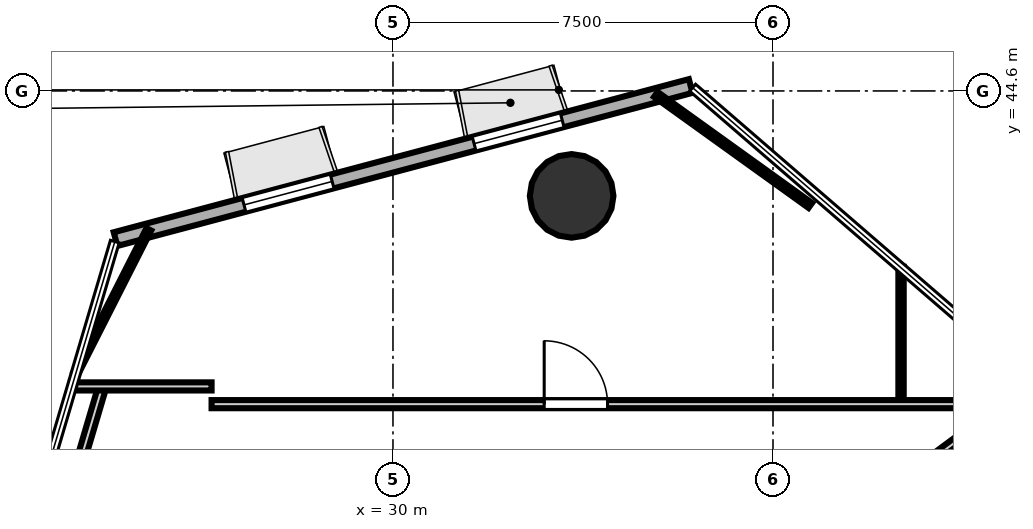
"""IFC4 building model, lengths in metres.
Left out: names, types, materials, properties, quantities, classifications, styles, units other than length and angle.
Written with IfcOpenShell. Run it as: python <this file> out.ifc"""

import sys

from ifc_helpers import new_model, si_unit, direction, frame, frame_2d, origin, origin_2d, place, context, subcontext, project, spatial, rectangle, hollow_circle, extrude, element, fill, save


model = new_model("IFC4")
c1 = context("Model", 3, precision=1e-05, world=origin(), true_north=direction((0.0, 1.0)))
c2 = subcontext(c1, "Body", "Model", "MODEL_VIEW")
j1 = project(units=[si_unit("LENGTHUNIT", "METRE"), si_unit("PLANEANGLEUNIT", "RADIAN")], contexts=[c1])
p1 = place(None, origin())
s1 = spatial("IfcSite", under=j1, at=p1, CompositionType="ELEMENT")
p2 = place(p1, origin())
s2 = spatial("IfcBuilding", under=s1, at=p2, CompositionType="ELEMENT")
p3 = place(p2, frame((0.0, 0.0, 74.7)))
s3 = spatial("IfcBuildingStorey", under=s2, at=p3, CompositionType="ELEMENT", Elevation=74.7)
p4 = place(p3, frame((33.526, 42.529, 0.0), z_axis=(0.0, 0.0, 1.0), x_axis=(1.0, 0.0, 0.0)))
e1 = element("IfcColumn", 1, at=p4, inside=s3, PredefinedType="COLUMN", context=c2, shape_type="SweptSolid", body=[
    extrude(hollow_circle(Radius=0.825, WallThickness=0.04, at=origin_2d()), origin(), (0.0, 0.0, 1.0), 3.7),
])
p5 = place(p3, frame((35.876, 44.697, 0.0), z_axis=(0.0, 0.0, 1.0), x_axis=(-0.966352126806, -0.257222796459, 0.0)))
e2 = element("IfcWall", 2, at=p5, inside=s3, PredefinedType="SOLIDWALL", context=c2, shape_type="SweptSolid", body=[
    extrude(rectangle(XDim=11.747, YDim=0.28, at=frame_2d((5.873, 0.0))), origin(), (0.0, 0.0, 1.0), 3.52),
])
p6 = place(p5, frame((2.624, 0.0, 0.85)))
e3 = element("IfcOpeningElement", 3, at=p6, cuts=e2, PredefinedType="OPENING", context=c2, shape_type="SweptSolid", body=[
    extrude(rectangle(XDim=1.8, YDim=2.1, at=frame_2d((0.9, 1.05))), frame((0.0, 0.15, 0.0), z_axis=(0.0, -1.0, 0.0), x_axis=(1.0, 0.0, 0.0)), (0.0, 0.0, 1.0), 0.3),
])
p7 = place(p5, frame((7.323, 0.0, 0.85)))
e4 = element("IfcOpeningElement", 4, at=p7, cuts=e2, PredefinedType="OPENING", context=c2, shape_type="SweptSolid", body=[
    extrude(rectangle(XDim=1.8, YDim=2.1, at=frame_2d((0.9, 1.05))), frame((0.0, 0.15, 0.0), z_axis=(0.0, -1.0, 0.0), x_axis=(1.0, 0.0, 0.0)), (0.0, 0.0, 1.0), 0.3),
])
p8 = place(p3, frame((23.58, 36.452, 0.0), z_axis=(0.0, 0.0, 1.0), x_axis=(0.283774880496, 0.958890930815, 0.0)))
e5 = element("IfcWall", 5, at=p8, inside=s3, PredefinedType="PARTITIONING", context=c2, shape_type="SweptSolid", body=[
    extrude(rectangle(XDim=2.44, YDim=0.16, at=frame_2d((1.22, 0.0))), origin(), (0.0, 0.0, 1.0), 2.84),
])
p9 = place(p3, frame((23.645, 38.769, 0.0), z_axis=(0.0, 0.0, 1.0), x_axis=(1.0, 0.0, 0.0)))
e6 = element("IfcWall", 6, at=p9, inside=s3, PredefinedType="PARTITIONING", context=c2, shape_type="SweptSolid", body=[
    extrude(rectangle(XDim=2.775, YDim=0.16, at=frame_2d((1.388, 0.0))), origin(), (0.0, 0.0, 1.0), 2.84),
])
p10 = place(p3, frame((26.42, 38.419, 0.0), z_axis=(0.0, 0.0, 1.0), x_axis=(1.0, 0.0, 0.0)))
e7 = element("IfcWall", 7, at=p10, inside=s3, PredefinedType="PARTITIONING", context=c2, shape_type="SweptSolid", body=[
    extrude(rectangle(XDim=16.741, YDim=0.16, at=frame_2d((8.37, 0.0))), origin(), (0.0, 0.0, 1.0), 2.798),
])
p11 = place(p10, frame((6.564, 0.0, 0.0)))
e8 = element("IfcOpeningElement", 8, at=p11, cuts=e7, PredefinedType="OPENING", context=c2, shape_type="SweptSolid", body=[
    extrude(rectangle(XDim=1.25, YDim=2.2, at=frame_2d((0.625, 1.1))), frame((0.0, 0.09, 0.0), z_axis=(0.0, -1.0, 0.0), x_axis=(1.0, 0.0, 0.0)), (0.0, 0.0, 1.0), 0.18),
])
p12 = place(p3, frame((42.68, 38.843, 0.0), z_axis=(0.0, 0.0, 1.0), x_axis=(-0.80280556572, -0.596240910747, 0.0)))
e9 = element("IfcWall", 9, at=p12, inside=s3, PredefinedType="PARTITIONING", context=c2, shape_type="SweptSolid", body=[
    extrude(rectangle(XDim=3.571, YDim=0.16, at=frame_2d((1.785, 0.0))), origin(), (0.0, 0.0, 1.0), 2.798),
])
p13 = place(p3, frame((40.027, 41.13, 0.0), z_axis=(0.0, 0.0, 1.0), x_axis=(0.0, -1.0, 0.0)))
e10 = element("IfcWall", 10, at=p13, inside=s3, PredefinedType="PARTITIONING", context=c2, shape_type="SweptSolid", body=[
    extrude(rectangle(XDim=2.6, YDim=0.105, at=frame_2d((1.3, 0.0))), origin(), (0.0, 0.0, 1.0), 2.84),
])
p14 = place(p3, frame((23.743, 39.035, 0.0), z_axis=(0.0, 0.0, 1.0), x_axis=(0.452766588837, 0.891629079849, 0.0)))
e11 = element("IfcWall", 11, at=p14, inside=s3, PredefinedType="PARTITIONING", context=c2, shape_type="SweptSolid", body=[
    extrude(rectangle(XDim=3.178, YDim=0.105, at=frame_2d((1.589, 0.0))), origin(), (0.0, 0.0, 1.0), 2.84),
])
p15 = place(p3, frame((35.187, 44.531, 0.0), z_axis=(0.0, 0.0, 1.0), x_axis=(0.812091442734, -0.583530195139, 0.0)))
e12 = element("IfcWall", 12, at=p15, inside=s3, PredefinedType="PARTITIONING", context=c2, shape_type="SweptSolid", body=[
    extrude(rectangle(XDim=3.755, YDim=0.12, at=frame_2d((1.877, 0.0))), origin(), (0.0, 0.0, 1.0), 2.84),
])
p16 = place(p11, origin())
e13 = element("IfcDoor", 13, at=p16, inside=s3, OperationType="SINGLE_SWING_LEFT", PredefinedType="DOOR", context=c2, shape_type="SweptSolid", body=[
    extrude(rectangle(XDim=1.25, YDim=2.2, at=frame_2d((0.625, 1.1))), frame((0.0, 0.025, 0.0), z_axis=(0.0, -1.0, 0.0), x_axis=(1.0, 0.0, 0.0)), (0.0, 0.0, 1.0), 0.05),
])
fill(e8, e13)
p17 = place(p6, origin())
e14 = element("IfcWindow", 14, at=p17, inside=s3, PartitioningType="SINGLE_PANEL", PredefinedType="WINDOW", context=c2, shape_type="SweptSolid", body=[
    extrude(rectangle(XDim=1.8, YDim=2.1, at=frame_2d((0.9, 1.05))), frame((0.0, 0.03, 0.0), z_axis=(0.0, -1.0, 0.0), x_axis=(1.0, 0.0, 0.0)), (0.0, 0.0, 1.0), 0.06),
])
fill(e3, e14)
p18 = place(p7, origin())
e15 = element("IfcWindow", 15, at=p18, inside=s3, PartitioningType="SINGLE_PANEL", PredefinedType="WINDOW", context=c2, shape_type="SweptSolid", body=[
    extrude(rectangle(XDim=1.8, YDim=2.1, at=frame_2d((0.9, 1.05))), frame((0.0, 0.03, 0.0), z_axis=(0.0, -1.0, 0.0), x_axis=(1.0, 0.0, 0.0)), (0.0, 0.0, 1.0), 0.06),
])
fill(e4, e15)
save(model, sys.argv[1])
